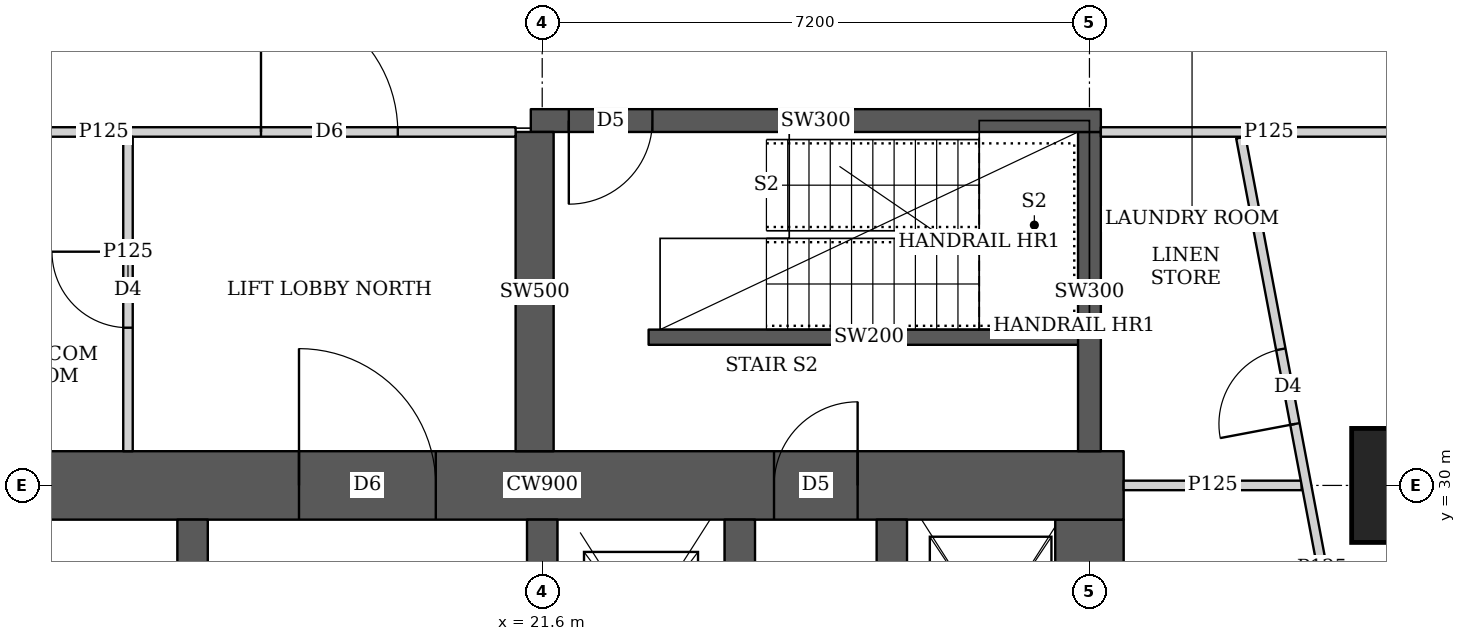
"""IFC4 building model, lengths in metres.
Left out: names, types, materials, properties, quantities, classifications, styles, units other than length and angle.
Written with IfcOpenShell. Run it as: python <this file> out.ifc"""

import sys

from ifc_helpers import new_model, si_unit, direction, frame, frame_2d, origin, origin_2d, place, context, subcontext, project, spatial, rectangle, extrude, element, fill, save


model = new_model("IFC4")
c1 = context("Model", 3, precision=1e-05, world=origin(), true_north=direction((0.0, 1.0)))
c2 = subcontext(c1, "Body", "Model", "MODEL_VIEW")
j1 = project(units=[si_unit("LENGTHUNIT", "METRE"), si_unit("PLANEANGLEUNIT", "RADIAN")], contexts=[c1])
p1 = place(None, origin())
s1 = spatial("IfcSite", under=j1, at=p1, CompositionType="ELEMENT")
p2 = place(p1, origin())
s2 = spatial("IfcBuilding", under=s1, at=p2, CompositionType="ELEMENT")
p3 = place(p2, frame((0.0, 0.0, 135.8)))
s3 = spatial("IfcBuildingStorey", under=s2, at=p3, CompositionType="ELEMENT", Elevation=135.8)
p4 = place(p3, frame((33.0, 30.0, 0.0), z_axis=(0.0, 0.0, 1.0), x_axis=(1.0, 0.0, 0.0)))
e1 = element("IfcColumn", 1, at=p4, inside=s3, PredefinedType="COLUMN", context=c2, shape_type="SweptSolid", body=[
    extrude(rectangle(XDim=1.5, YDim=1.5, at=origin_2d()), origin(), (0.0, 0.0, 1.0), 3.75),
])
p5 = place(p3, frame((13.95, 30.0, 0.0), z_axis=(0.0, 0.0, 1.0), x_axis=(1.0, 0.0, 0.0)))
e2 = element("IfcWall", 2, at=p5, inside=s3, PredefinedType="SHEAR", context=c2, shape_type="SweptSolid", body=[
    extrude(rectangle(XDim=15.3, YDim=0.9, at=frame_2d((7.65, 0.0))), origin(), (0.0, 0.0, 1.0), 3.75),
])
p6 = place(p5, frame((4.45, 0.0, 0.0)))
e3 = element("IfcOpeningElement", 3, at=p6, cuts=e2, PredefinedType="OPENING", context=c2, shape_type="SweptSolid", body=[
    extrude(rectangle(XDim=1.8, YDim=2.1, at=frame_2d((0.9, 1.05))), frame((0.0, 0.46, 0.0), z_axis=(0.0, -1.0, 0.0), x_axis=(1.0, 0.0, 0.0)), (0.0, 0.0, 1.0), 0.92),
])
p7 = place(p5, frame((10.7, 0.0, 0.0)))
e4 = element("IfcOpeningElement", 4, at=p7, cuts=e2, PredefinedType="OPENING", context=c2, shape_type="SweptSolid", body=[
    extrude(rectangle(XDim=1.1, YDim=2.1, at=frame_2d((0.55, 1.05))), frame((0.0, 0.46, 0.0), z_axis=(0.0, -1.0, 0.0), x_axis=(1.0, 0.0, 0.0)), (0.0, 0.0, 1.0), 0.92),
])
p8 = place(p3, frame((28.8, 15.45, 0.0), z_axis=(0.0, 0.0, 1.0), x_axis=(0.0, 1.0, 0.0)))
e5 = element("IfcWall", 5, at=p8, inside=s3, PredefinedType="SHEAR", context=c2, shape_type="SweptSolid", body=[
    extrude(rectangle(XDim=14.1, YDim=0.9, at=frame_2d((7.05, 0.0))), origin(), (0.0, 0.0, 1.0), 3.75),
])
p9 = place(p3, frame((17.0, 15.45, 0.0), z_axis=(0.0, 0.0, 1.0), x_axis=(0.0, 1.0, 0.0)))
e6 = element("IfcWall", 6, at=p9, inside=s3, PredefinedType="SHEAR", context=c2, shape_type="SweptSolid", body=[
    extrude(rectangle(XDim=14.1, YDim=0.4, at=frame_2d((7.05, 0.0))), origin(), (0.0, 0.0, 1.0), 3.75),
])
p10 = place(p9, frame((0.925, 0.0, 0.0)))
e7 = element("IfcOpeningElement", 7, at=p10, cuts=e6, PredefinedType="OPENING", context=c2, shape_type="SweptSolid", body=[
    extrude(rectangle(XDim=1.0, YDim=2.1, at=frame_2d((0.5, 1.05))), frame((0.0, 0.21, 0.0), z_axis=(0.0, -1.0, 0.0), x_axis=(1.0, 0.0, 0.0)), (0.0, 0.0, 1.0), 0.42),
])
p11 = place(p9, frame((4.675, 0.0, 0.0)))
e8 = element("IfcOpeningElement", 8, at=p11, cuts=e6, PredefinedType="OPENING", context=c2, shape_type="SweptSolid", body=[
    extrude(rectangle(XDim=1.0, YDim=2.1, at=frame_2d((0.5, 1.05))), frame((0.0, 0.21, 0.0), z_axis=(0.0, -1.0, 0.0), x_axis=(1.0, 0.0, 0.0)), (0.0, 0.0, 1.0), 0.42),
])
p12 = place(p9, frame((8.425, 0.0, 0.0)))
e9 = element("IfcOpeningElement", 9, at=p12, cuts=e6, PredefinedType="OPENING", context=c2, shape_type="SweptSolid", body=[
    extrude(rectangle(XDim=1.0, YDim=2.1, at=frame_2d((0.5, 1.05))), frame((0.0, 0.21, 0.0), z_axis=(0.0, -1.0, 0.0), x_axis=(1.0, 0.0, 0.0)), (0.0, 0.0, 1.0), 0.42),
])
p13 = place(p9, frame((12.175, 0.0, 0.0)))
e10 = element("IfcOpeningElement", 10, at=p13, cuts=e6, PredefinedType="OPENING", context=c2, shape_type="SweptSolid", body=[
    extrude(rectangle(XDim=1.0, YDim=2.1, at=frame_2d((0.5, 1.05))), frame((0.0, 0.21, 0.0), z_axis=(0.0, -1.0, 0.0), x_axis=(1.0, 0.0, 0.0)), (0.0, 0.0, 1.0), 0.42),
])
p14 = place(p3, frame((21.6, 15.45, 0.0), z_axis=(0.0, 0.0, 1.0), x_axis=(0.0, 1.0, 0.0)))
e11 = element("IfcWall", 11, at=p14, inside=s3, PredefinedType="SHEAR", context=c2, shape_type="SweptSolid", body=[
    extrude(rectangle(XDim=14.1, YDim=0.4, at=frame_2d((7.05, 0.0))), origin(), (0.0, 0.0, 1.0), 3.75),
])
p15 = place(p14, frame((0.875, 0.0, 0.0)))
e12 = element("IfcOpeningElement", 12, at=p15, cuts=e11, PredefinedType="OPENING", context=c2, shape_type="SweptSolid", body=[
    extrude(rectangle(XDim=1.1, YDim=2.1, at=frame_2d((0.55, 1.05))), frame((0.0, 0.21, 0.0), z_axis=(0.0, -1.0, 0.0), x_axis=(1.0, 0.0, 0.0)), (0.0, 0.0, 1.0), 0.42),
])
p16 = place(p14, frame((4.625, 0.0, 0.0)))
e13 = element("IfcOpeningElement", 13, at=p16, cuts=e11, PredefinedType="OPENING", context=c2, shape_type="SweptSolid", body=[
    extrude(rectangle(XDim=1.1, YDim=2.1, at=frame_2d((0.55, 1.05))), frame((0.0, 0.21, 0.0), z_axis=(0.0, -1.0, 0.0), x_axis=(1.0, 0.0, 0.0)), (0.0, 0.0, 1.0), 0.42),
])
p17 = place(p14, frame((8.375, 0.0, 0.0)))
e14 = element("IfcOpeningElement", 14, at=p17, cuts=e11, PredefinedType="OPENING", context=c2, shape_type="SweptSolid", body=[
    extrude(rectangle(XDim=1.1, YDim=2.1, at=frame_2d((0.55, 1.05))), frame((0.0, 0.21, 0.0), z_axis=(0.0, -1.0, 0.0), x_axis=(1.0, 0.0, 0.0)), (0.0, 0.0, 1.0), 0.42),
])
p18 = place(p14, frame((12.125, 0.0, 0.0)))
e15 = element("IfcOpeningElement", 15, at=p18, cuts=e11, PredefinedType="OPENING", context=c2, shape_type="SweptSolid", body=[
    extrude(rectangle(XDim=1.1, YDim=2.1, at=frame_2d((0.55, 1.05))), frame((0.0, 0.21, 0.0), z_axis=(0.0, -1.0, 0.0), x_axis=(1.0, 0.0, 0.0)), (0.0, 0.0, 1.0), 0.42),
])
p19 = place(p3, frame((24.2, 15.45, 0.0), z_axis=(0.0, 0.0, 1.0), x_axis=(0.0, 1.0, 0.0)))
e16 = element("IfcWall", 16, at=p19, inside=s3, PredefinedType="SHEAR", context=c2, shape_type="SweptSolid", body=[
    extrude(rectangle(XDim=14.1, YDim=0.4, at=frame_2d((7.05, 0.0))), origin(), (0.0, 0.0, 1.0), 3.75),
])
p20 = place(p3, frame((26.2, 26.45, 0.0), z_axis=(0.0, 0.0, 1.0), x_axis=(0.0, 1.0, 0.0)))
e17 = element("IfcWall", 17, at=p20, inside=s3, PredefinedType="SHEAR", context=c2, shape_type="SweptSolid", body=[
    extrude(rectangle(XDim=3.1, YDim=0.4, at=frame_2d((1.55, 0.0))), origin(), (0.0, 0.0, 1.0), 3.75),
])
p21 = place(p20, frame((1.075, 0.0, 0.0)))
e18 = element("IfcOpeningElement", 18, at=p21, cuts=e17, PredefinedType="OPENING", context=c2, shape_type="SweptSolid", body=[
    extrude(rectangle(XDim=1.2, YDim=2.1, at=frame_2d((0.6, 1.05))), frame((0.0, 0.21, 0.0), z_axis=(0.0, -1.0, 0.0), x_axis=(1.0, 0.0, 0.0)), (0.0, 0.0, 1.0), 0.42),
])
p22 = place(p3, frame((21.45, 34.8, 0.0), z_axis=(0.0, 0.0, 1.0), x_axis=(1.0, 0.0, 0.0)))
e19 = element("IfcWall", 19, at=p22, inside=s3, PredefinedType="SHEAR", context=c2, shape_type="SweptSolid", body=[
    extrude(rectangle(XDim=7.5, YDim=0.3, at=frame_2d((3.75, 0.0))), origin(), (0.0, 0.0, 1.0), 3.75),
])
p23 = place(p22, frame((0.5, 0.0, 0.0)))
e20 = element("IfcOpeningElement", 20, at=p23, cuts=e19, PredefinedType="OPENING", context=c2, shape_type="SweptSolid", body=[
    extrude(rectangle(XDim=1.1, YDim=2.1, at=frame_2d((0.55, 1.05))), frame((0.0, 0.16, 0.0), z_axis=(0.0, -1.0, 0.0), x_axis=(1.0, 0.0, 0.0)), (0.0, 0.0, 1.0), 0.32),
])
p24 = place(p3, frame((21.5, 30.45, 0.0), z_axis=(0.0, 0.0, 1.0), x_axis=(0.0, 1.0, 0.0)))
e21 = element("IfcWall", 21, at=p24, inside=s3, PredefinedType="SHEAR", context=c2, shape_type="SweptSolid", body=[
    extrude(rectangle(XDim=4.2, YDim=0.5, at=frame_2d((2.1, 0.0))), origin(), (0.0, 0.0, 1.0), 3.75),
])
p25 = place(p3, frame((28.8, 30.45, 0.0), z_axis=(0.0, 0.0, 1.0), x_axis=(0.0, 1.0, 0.0)))
e22 = element("IfcWall", 22, at=p25, inside=s3, PredefinedType="SHEAR", context=c2, shape_type="SweptSolid", body=[
    extrude(rectangle(XDim=4.2, YDim=0.3, at=frame_2d((2.1, 0.0))), origin(), (0.0, 0.0, 1.0), 3.75),
])
p26 = place(p3, frame((10.413, 34.65, 0.0), z_axis=(0.0, 0.0, 1.0), x_axis=(1.0, 0.0, 0.0)))
e23 = element("IfcWall", 23, at=p26, inside=s3, PredefinedType="PARTITIONING", context=c2, shape_type="SweptSolid", body=[
    extrude(rectangle(XDim=10.837, YDim=0.125, at=frame_2d((5.418, 0.0))), origin(), (0.0, 0.0, 1.0), 3.5),
])
p27 = place(p26, frame((7.487, 0.0, 0.0)))
e24 = element("IfcOpeningElement", 24, at=p27, cuts=e23, PredefinedType="OPENING", context=c2, shape_type="SweptSolid", body=[
    extrude(rectangle(XDim=1.8, YDim=2.1, at=frame_2d((0.9, 1.05))), frame((0.0, 0.073, 0.0), z_axis=(0.0, -1.0, 0.0), x_axis=(1.0, 0.0, 0.0)), (0.0, 0.0, 1.0), 0.145),
])
p28 = place(p3, frame((16.15, 30.45, 0.0), z_axis=(0.0, 0.0, 1.0), x_axis=(0.0, 1.0, 0.0)))
e25 = element("IfcWall", 25, at=p28, inside=s3, PredefinedType="PARTITIONING", context=c2, shape_type="SweptSolid", body=[
    extrude(rectangle(XDim=4.137, YDim=0.125, at=frame_2d((2.068, 0.0))), origin(), (0.0, 0.0, 1.0), 3.5),
])
p29 = place(p28, frame((1.625, 0.0, 0.0)))
e26 = element("IfcOpeningElement", 26, at=p29, cuts=e25, PredefinedType="OPENING", context=c2, shape_type="SweptSolid", body=[
    extrude(rectangle(XDim=1.0, YDim=2.1, at=frame_2d((0.5, 1.05))), frame((0.0, 0.073, 0.0), z_axis=(0.0, -1.0, 0.0), x_axis=(1.0, 0.0, 0.0)), (0.0, 0.0, 1.0), 0.145),
])
p30 = place(p3, frame((28.95, 34.65, 0.0), z_axis=(0.0, 0.0, 1.0), x_axis=(1.0, 0.0, 0.0)))
e27 = element("IfcWall", 27, at=p30, inside=s3, PredefinedType="PARTITIONING", context=c2, shape_type="SweptSolid", body=[
    extrude(rectangle(XDim=4.423, YDim=0.125, at=frame_2d((2.211, 0.0))), origin(), (0.0, 0.0, 1.0), 3.5),
])
p31 = place(p3, frame((32.929, 23.263, 0.0), z_axis=(0.0, 0.0, 1.0), x_axis=(-0.185612234763, 0.982623070311, 0.0)))
e28 = element("IfcWall", 28, at=p31, inside=s3, PredefinedType="PARTITIONING", context=c2, shape_type="SweptSolid", body=[
    extrude(rectangle(XDim=11.513, YDim=0.125, at=frame_2d((5.756, 0.0))), origin(), (0.0, 0.0, 1.0), 3.5),
])
p32 = place(p31, frame((0.15, 0.0, 0.0)))
e29 = element("IfcOpeningElement", 29, at=p32, cuts=e28, PredefinedType="OPENING", context=c2, shape_type="SweptSolid", body=[
    extrude(rectangle(XDim=1.0, YDim=2.1, at=frame_2d((0.5, 1.05))), frame((0.0, 0.073, 0.0), z_axis=(0.0, -1.0, 0.0), x_axis=(1.0, 0.0, 0.0)), (0.0, 0.0, 1.0), 0.145),
])
p33 = place(p31, frame((7.679, 0.0, 0.0)))
e30 = element("IfcOpeningElement", 30, at=p33, cuts=e28, PredefinedType="OPENING", context=c2, shape_type="SweptSolid", body=[
    extrude(rectangle(XDim=1.0, YDim=2.1, at=frame_2d((0.5, 1.05))), frame((0.0, 0.073, 0.0), z_axis=(0.0, -1.0, 0.0), x_axis=(1.0, 0.0, 0.0)), (0.0, 0.0, 1.0), 0.145),
])
p34 = place(p3, frame((29.25, 30.0, 0.0), z_axis=(0.0, 0.0, 1.0), x_axis=(1.0, 0.0, 0.0)))
e31 = element("IfcWall", 31, at=p34, inside=s3, PredefinedType="PARTITIONING", context=c2, shape_type="SweptSolid", body=[
    extrude(rectangle(XDim=2.342, YDim=0.125, at=frame_2d((1.171, 0.0))), origin(), (0.0, 0.0, 1.0), 3.5),
])
p35 = place(p3, frame((23.0, 31.95, 0.0), z_axis=(0.0, 0.0, 1.0), x_axis=(1.0, 0.0, 0.0)))
e32 = element("IfcWall", 32, at=p35, inside=s3, PredefinedType="SHEAR", context=c2, shape_type="SweptSolid", body=[
    extrude(rectangle(XDim=5.8, YDim=0.2, at=frame_2d((2.9, 0.0))), origin(), (0.0, 0.0, 1.0), 3.75),
])
p36 = place(p29, origin())
e33 = element("IfcDoor", 33, at=p36, inside=s3, OperationType="SINGLE_SWING_RIGHT", PredefinedType="DOOR", context=c2, shape_type="SweptSolid", body=[
    extrude(rectangle(XDim=1.0, YDim=2.1, at=frame_2d((0.5, 1.05))), frame((0.0, 0.025, 0.0), z_axis=(0.0, -1.0, 0.0), x_axis=(1.0, 0.0, 0.0)), (0.0, 0.0, 1.0), 0.05),
])
fill(e26, e33)
p37 = place(p27, origin())
e34 = element("IfcDoor", 34, at=p37, inside=s3, OperationType="DOUBLE_DOOR_SINGLE_SWING", PredefinedType="DOOR", context=c2, shape_type="SweptSolid", body=[
    extrude(rectangle(XDim=1.8, YDim=2.1, at=frame_2d((0.9, 1.05))), frame((0.0, 0.025, 0.0), z_axis=(0.0, -1.0, 0.0), x_axis=(1.0, 0.0, 0.0)), (0.0, 0.0, 1.0), 0.05),
])
fill(e24, e34)
p38 = place(p33, origin())
e35 = element("IfcDoor", 35, at=p38, inside=s3, OperationType="SINGLE_SWING_LEFT", PredefinedType="DOOR", context=c2, shape_type="SweptSolid", body=[
    extrude(rectangle(XDim=1.0, YDim=2.1, at=frame_2d((0.5, 1.05))), frame((0.0, 0.025, 0.0), z_axis=(0.0, -1.0, 0.0), x_axis=(1.0, 0.0, 0.0)), (0.0, 0.0, 1.0), 0.05),
])
fill(e30, e35)
p39 = place(p6, origin())
e36 = element("IfcDoor", 36, at=p39, inside=s3, OperationType="DOUBLE_DOOR_SINGLE_SWING", PredefinedType="DOOR", context=c2, shape_type="SweptSolid", body=[
    extrude(rectangle(XDim=1.8, YDim=2.1, at=frame_2d((0.9, 1.05))), frame((0.0, 0.025, 0.0), z_axis=(0.0, -1.0, 0.0), x_axis=(1.0, 0.0, 0.0)), (0.0, 0.0, 1.0), 0.05),
])
fill(e3, e36)
p40 = place(p7, origin())
e37 = element("IfcDoor", 37, at=p40, inside=s3, OperationType="SINGLE_SWING_RIGHT", PredefinedType="DOOR", context=c2, shape_type="SweptSolid", body=[
    extrude(rectangle(XDim=1.1, YDim=2.1, at=frame_2d((0.55, 1.05))), frame((0.0, 0.025, 0.0), z_axis=(0.0, -1.0, 0.0), x_axis=(1.0, 0.0, 0.0)), (0.0, 0.0, 1.0), 0.05),
])
fill(e4, e37)
p41 = place(p23, origin())
e38 = element("IfcDoor", 38, at=p41, inside=s3, OperationType="SINGLE_SWING_RIGHT", PredefinedType="DOOR", context=c2, shape_type="SweptSolid", body=[
    extrude(rectangle(XDim=1.1, YDim=2.1, at=frame_2d((0.55, 1.05))), frame((0.0, 0.025, 0.0), z_axis=(0.0, -1.0, 0.0), x_axis=(1.0, 0.0, 0.0)), (0.0, 0.0, 1.0), 0.05),
])
fill(e20, e38)
save(model, sys.argv[1])
